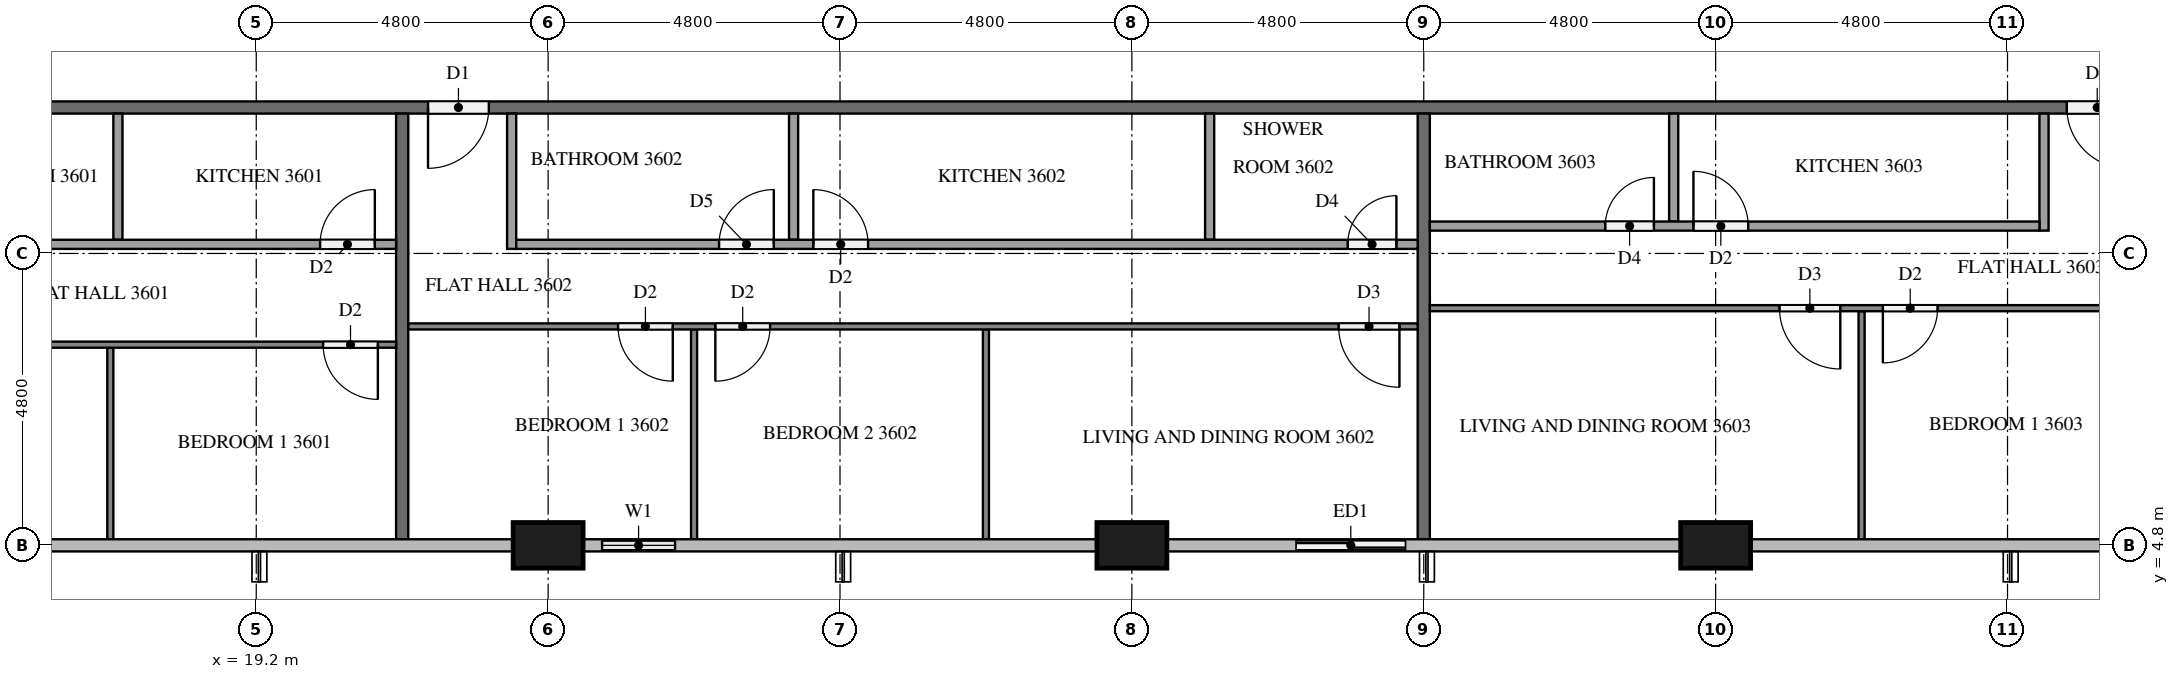
"""IFC4 building model, lengths in metres.
Left out: names, types, materials, properties, quantities, classifications, styles, units other than length and angle.
Written with IfcOpenShell. Run it as: python <this file> out.ifc"""

import sys

from ifc_helpers import new_model, si_unit, direction, frame, frame_2d, origin, origin_2d, place, context, subcontext, project, spatial, rectangle, extrude, element, fill, save


model = new_model("IFC4")
c1 = context("Model", 3, precision=1e-05, world=origin(), true_north=direction((0.0, 1.0)))
c2 = subcontext(c1, "Body", "Model", "MODEL_VIEW")
j1 = project(units=[si_unit("LENGTHUNIT", "METRE"), si_unit("PLANEANGLEUNIT", "RADIAN")], contexts=[c1])
p1 = place(None, origin())
s1 = spatial("IfcSite", under=j1, at=p1, CompositionType="ELEMENT")
p2 = place(p1, origin())
s2 = spatial("IfcBuilding", under=s1, at=p2, CompositionType="ELEMENT")
p3 = place(p2, frame((0.0, 0.0, 140.1)))
s3 = spatial("IfcBuildingStorey", under=s2, at=p3, CompositionType="ELEMENT", Elevation=140.1)
for number, where, z_axis, x_axis in (
    (1, (24.0, 4.8, 0.0), (0.0, 0.0, 1.0), (1.0, 0.0, 0.0)),
    (2, (33.6, 4.8, 0.0), (0.0, 0.0, 1.0), (1.0, 0.0, 0.0)),
    (3, (43.2, 4.8, 0.0), (0.0, 0.0, 1.0), (1.0, 0.0, 0.0)),
):
    element("IfcColumn", number, at=place(p3, frame(where, z_axis=z_axis, x_axis=x_axis)), inside=s3, PredefinedType="COLUMN", context=c2, shape_type="SweptSolid", body=[
        extrude(rectangle(XDim=1.15, YDim=0.75, at=origin_2d()), origin(), (0.0, 0.0, 1.0), 3.1),
    ])
p4 = place(p3, frame((24.575, 4.8, 0.0), z_axis=(0.0, 0.0, 1.0), x_axis=(1.0, 0.0, 0.0)))
e4 = element("IfcWall", 4, at=p4, inside=s3, PredefinedType="SOLIDWALL", context=c2, shape_type="SweptSolid", body=[
    extrude(rectangle(XDim=1.825, YDim=0.15, at=frame_2d((0.913, 0.0))), origin(), (0.0, 0.0, 1.0), 3.1),
])
p5 = place(p4, frame((0.312, 0.0, 0.9)))
e5 = element("IfcOpeningElement", 5, at=p5, cuts=e4, PredefinedType="OPENING", context=c2, shape_type="SweptSolid", body=[
    extrude(rectangle(XDim=1.2, YDim=1.4, at=frame_2d((0.6, 0.7))), frame((0.0, 0.085, 0.0), z_axis=(0.0, -1.0, 0.0), x_axis=(1.0, 0.0, 0.0)), (0.0, 0.0, 1.0), 0.17),
])
p6 = place(p3, frame((36.0, 4.8, 0.0), z_axis=(0.0, 0.0, 1.0), x_axis=(1.0, 0.0, 0.0)))
e6 = element("IfcWall", 6, at=p6, inside=s3, PredefinedType="SOLIDWALL", context=c2, shape_type="SweptSolid", body=[
    extrude(rectangle(XDim=2.4, YDim=0.15, at=frame_2d((1.2, 0.0))), origin(), (0.0, 0.0, 1.0), 3.1),
])
p7 = place(p6, frame((0.3, 0.0, 0.0)))
e7 = element("IfcOpeningElement", 7, at=p7, cuts=e6, PredefinedType="OPENING", context=c2, shape_type="SweptSolid", body=[
    extrude(rectangle(XDim=1.8, YDim=2.4, at=frame_2d((0.9, 1.2))), frame((0.0, 0.085, 0.0), z_axis=(0.0, -1.0, 0.0), x_axis=(1.0, 0.0, 0.0)), (0.0, 0.0, 1.0), 0.17),
])
p8 = place(p3, frame((50.5, 12.0, 0.0), z_axis=(0.0, 0.0, 1.0), x_axis=(-1.0, 0.0, 0.0)))
e8 = element("IfcWall", 8, at=p8, inside=s3, PredefinedType="PARTITIONING", context=c2, shape_type="SweptSolid", body=[
    extrude(rectangle(XDim=38.6, YDim=0.2, at=frame_2d((19.3, 0.0))), origin(), (0.0, 0.0, 1.0), 3.1),
])
p9 = place(p8, frame((37.075, 0.0, 0.0)))
e9 = element("IfcOpeningElement", 9, at=p9, cuts=e8, PredefinedType="OPENING", context=c2, shape_type="SweptSolid", body=[
    extrude(rectangle(XDim=1.0, YDim=2.1, at=frame_2d((0.5, 1.05))), frame((0.0, 0.11, 0.0), z_axis=(0.0, -1.0, 0.0), x_axis=(1.0, 0.0, 0.0)), (0.0, 0.0, 1.0), 0.22),
])
p10 = place(p8, frame((27.475, 0.0, 0.0)))
e10 = element("IfcOpeningElement", 10, at=p10, cuts=e8, PredefinedType="OPENING", context=c2, shape_type="SweptSolid", body=[
    extrude(rectangle(XDim=1.0, YDim=2.1, at=frame_2d((0.5, 1.05))), frame((0.0, 0.11, 0.0), z_axis=(0.0, -1.0, 0.0), x_axis=(1.0, 0.0, 0.0)), (0.0, 0.0, 1.0), 0.22),
])
p11 = place(p8, frame((0.525, 0.0, 0.0)))
e11 = element("IfcOpeningElement", 11, at=p11, cuts=e8, PredefinedType="OPENING", context=c2, shape_type="SweptSolid", body=[
    extrude(rectangle(XDim=1.0, YDim=2.1, at=frame_2d((0.5, 1.05))), frame((0.0, 0.11, 0.0), z_axis=(0.0, -1.0, 0.0), x_axis=(1.0, 0.0, 0.0)), (0.0, 0.0, 1.0), 0.22),
])
for number, where, z_axis, x_axis in (
    (12, (21.6, 11.9, 0.0), (0.0, 0.0, 1.0), (0.0, -1.0, 0.0)),
    (13, (38.4, 11.9, 0.0), (0.0, 0.0, 1.0), (0.0, -1.0, 0.0)),
):
    element("IfcWall", number, at=place(p3, frame(where, z_axis=z_axis, x_axis=x_axis)), inside=s3, PredefinedType="PARTITIONING", context=c2, shape_type="SweptSolid", body=[
        extrude(rectangle(XDim=7.0, YDim=0.2, at=frame_2d((3.5, 0.0))), origin(), (0.0, 0.0, 1.0), 3.1),
    ])
p12 = place(p3, frame((16.8, 8.05, 0.0), z_axis=(0.0, 0.0, 1.0), x_axis=(0.0, -1.0, 0.0)))
e14 = element("IfcWall", 14, at=p12, inside=s3, PredefinedType="PARTITIONING", context=c2, shape_type="SweptSolid", body=[
    extrude(rectangle(XDim=3.15, YDim=0.1, at=frame_2d((1.575, 0.0))), origin(), (0.0, 0.0, 1.0), 3.1),
])
p13 = place(p3, frame((21.5, 8.1, 0.0), z_axis=(0.0, 0.0, 1.0), x_axis=(-1.0, 0.0, 0.0)))
e15 = element("IfcWall", 15, at=p13, inside=s3, PredefinedType="PARTITIONING", context=c2, shape_type="SweptSolid", body=[
    extrude(rectangle(XDim=9.4, YDim=0.1, at=frame_2d((4.7, 0.0))), origin(), (0.0, 0.0, 1.0), 3.1),
])
p14 = place(p13, frame((8.1, 0.0, 0.0)))
e16 = element("IfcOpeningElement", 16, at=p14, cuts=e15, PredefinedType="OPENING", context=c2, shape_type="SweptSolid", body=[
    extrude(rectangle(XDim=1.0, YDim=2.1, at=frame_2d((0.5, 1.05))), frame((0.0, 0.06, 0.0), z_axis=(0.0, -1.0, 0.0), x_axis=(1.0, 0.0, 0.0)), (0.0, 0.0, 1.0), 0.12),
])
p15 = place(p13, frame((0.3, 0.0, 0.0)))
e17 = element("IfcOpeningElement", 17, at=p15, cuts=e15, PredefinedType="OPENING", context=c2, shape_type="SweptSolid", body=[
    extrude(rectangle(XDim=0.9, YDim=2.1, at=frame_2d((0.45, 1.05))), frame((0.0, 0.06, 0.0), z_axis=(0.0, -1.0, 0.0), x_axis=(1.0, 0.0, 0.0)), (0.0, 0.0, 1.0), 0.12),
])
p16 = place(p3, frame((16.925, 11.9, 0.0), z_axis=(0.0, 0.0, 1.0), x_axis=(0.0, -1.0, 0.0)))
e18 = element("IfcWall", 18, at=p16, inside=s3, PredefinedType="PARTITIONING", context=c2, shape_type="SweptSolid", body=[
    extrude(rectangle(XDim=2.075, YDim=0.15, at=frame_2d((1.038, 0.0))), origin(), (0.0, 0.0, 1.0), 3.1),
])
p17 = place(p3, frame((13.875, 9.75, 0.0), z_axis=(0.0, 0.0, 1.0), x_axis=(1.0, 0.0, 0.0)))
e19 = element("IfcWall", 19, at=p17, inside=s3, PredefinedType="PARTITIONING", context=c2, shape_type="SweptSolid", body=[
    extrude(rectangle(XDim=7.625, YDim=0.15, at=frame_2d((3.812, 0.0))), origin(), (0.0, 0.0, 1.0), 3.1),
])
p18 = place(p17, frame((0.3, 0.0, 0.0)))
e20 = element("IfcOpeningElement", 20, at=p18, cuts=e19, PredefinedType="OPENING", context=c2, shape_type="SweptSolid", body=[
    extrude(rectangle(XDim=0.8, YDim=2.1, at=frame_2d((0.4, 1.05))), frame((0.0, 0.085, 0.0), z_axis=(0.0, -1.0, 0.0), x_axis=(1.0, 0.0, 0.0)), (0.0, 0.0, 1.0), 0.17),
])
p19 = place(p17, frame((6.375, 0.0, 0.0)))
e21 = element("IfcOpeningElement", 21, at=p19, cuts=e19, PredefinedType="OPENING", context=c2, shape_type="SweptSolid", body=[
    extrude(rectangle(XDim=0.9, YDim=2.1, at=frame_2d((0.45, 1.05))), frame((0.0, 0.085, 0.0), z_axis=(0.0, -1.0, 0.0), x_axis=(1.0, 0.0, 0.0)), (0.0, 0.0, 1.0), 0.17),
])
for number, where, z_axis, x_axis in (
    (22, (26.4, 8.35, 0.0), (0.0, 0.0, 1.0), (0.0, -1.0, 0.0)),
    (23, (31.2, 8.35, 0.0), (0.0, 0.0, 1.0), (0.0, -1.0, 0.0)),
):
    element("IfcWall", number, at=place(p3, frame(where, z_axis=z_axis, x_axis=x_axis)), inside=s3, PredefinedType="PARTITIONING", context=c2, shape_type="SweptSolid", body=[
        extrude(rectangle(XDim=3.45, YDim=0.1, at=frame_2d((1.725, 0.0))), origin(), (0.0, 0.0, 1.0), 3.1),
    ])
p20 = place(p3, frame((38.3, 8.4, 0.0), z_axis=(0.0, 0.0, 1.0), x_axis=(-1.0, 0.0, 0.0)))
e24 = element("IfcWall", 24, at=p20, inside=s3, PredefinedType="PARTITIONING", context=c2, shape_type="SweptSolid", body=[
    extrude(rectangle(XDim=16.6, YDim=0.1, at=frame_2d((8.3, 0.0))), origin(), (0.0, 0.0, 1.0), 3.1),
])
p21 = place(p20, frame((12.25, 0.0, 0.0)))
e25 = element("IfcOpeningElement", 25, at=p21, cuts=e24, PredefinedType="OPENING", context=c2, shape_type="SweptSolid", body=[
    extrude(rectangle(XDim=0.9, YDim=2.1, at=frame_2d((0.45, 1.05))), frame((0.0, 0.06, 0.0), z_axis=(0.0, -1.0, 0.0), x_axis=(1.0, 0.0, 0.0)), (0.0, 0.0, 1.0), 0.12),
])
p22 = place(p20, frame((10.65, 0.0, 0.0)))
e26 = element("IfcOpeningElement", 26, at=p22, cuts=e24, PredefinedType="OPENING", context=c2, shape_type="SweptSolid", body=[
    extrude(rectangle(XDim=0.9, YDim=2.1, at=frame_2d((0.45, 1.05))), frame((0.0, 0.06, 0.0), z_axis=(0.0, -1.0, 0.0), x_axis=(1.0, 0.0, 0.0)), (0.0, 0.0, 1.0), 0.12),
])
p23 = place(p20, frame((0.3, 0.0, 0.0)))
e27 = element("IfcOpeningElement", 27, at=p23, cuts=e24, PredefinedType="OPENING", context=c2, shape_type="SweptSolid", body=[
    extrude(rectangle(XDim=1.0, YDim=2.1, at=frame_2d((0.5, 1.05))), frame((0.0, 0.06, 0.0), z_axis=(0.0, -1.0, 0.0), x_axis=(1.0, 0.0, 0.0)), (0.0, 0.0, 1.0), 0.12),
])
for number, where, z_axis, x_axis in (
    (28, (28.037, 11.9, 0.0), (0.0, 0.0, 1.0), (0.0, -1.0, 0.0)),
    (29, (34.879, 11.9, 0.0), (0.0, 0.0, 1.0), (0.0, -1.0, 0.0)),
):
    element("IfcWall", number, at=place(p3, frame(where, z_axis=z_axis, x_axis=x_axis)), inside=s3, PredefinedType="PARTITIONING", context=c2, shape_type="SweptSolid", body=[
        extrude(rectangle(XDim=2.075, YDim=0.15, at=frame_2d((1.038, 0.0))), origin(), (0.0, 0.0, 1.0), 3.1),
    ])
p24 = place(p3, frame((23.4, 11.9, 0.0), z_axis=(0.0, 0.0, 1.0), x_axis=(0.0, -1.0, 0.0)))
e30 = element("IfcWall", 30, at=p24, inside=s3, PredefinedType="PARTITIONING", context=c2, shape_type="SweptSolid", body=[
    extrude(rectangle(XDim=2.225, YDim=0.15, at=frame_2d((1.112, 0.0))), origin(), (0.0, 0.0, 1.0), 3.1),
])
p25 = place(p3, frame((23.475, 9.75, 0.0), z_axis=(0.0, 0.0, 1.0), x_axis=(1.0, 0.0, 0.0)))
e31 = element("IfcWall", 31, at=p25, inside=s3, PredefinedType="PARTITIONING", context=c2, shape_type="SweptSolid", body=[
    extrude(rectangle(XDim=14.825, YDim=0.15, at=frame_2d((7.413, 0.0))), origin(), (0.0, 0.0, 1.0), 3.1),
])
p26 = place(p25, frame((3.336, 0.0, 0.0)))
e32 = element("IfcOpeningElement", 32, at=p26, cuts=e31, PredefinedType="OPENING", context=c2, shape_type="SweptSolid", body=[
    extrude(rectangle(XDim=0.9, YDim=2.1, at=frame_2d((0.45, 1.05))), frame((0.0, 0.085, 0.0), z_axis=(0.0, -1.0, 0.0), x_axis=(1.0, 0.0, 0.0)), (0.0, 0.0, 1.0), 0.17),
])
p27 = place(p25, frame((4.886, 0.0, 0.0)))
e33 = element("IfcOpeningElement", 33, at=p27, cuts=e31, PredefinedType="OPENING", context=c2, shape_type="SweptSolid", body=[
    extrude(rectangle(XDim=0.9, YDim=2.1, at=frame_2d((0.45, 1.05))), frame((0.0, 0.085, 0.0), z_axis=(0.0, -1.0, 0.0), x_axis=(1.0, 0.0, 0.0)), (0.0, 0.0, 1.0), 0.17),
])
p28 = place(p25, frame((13.675, 0.0, 0.0)))
e34 = element("IfcOpeningElement", 34, at=p28, cuts=e31, PredefinedType="OPENING", context=c2, shape_type="SweptSolid", body=[
    extrude(rectangle(XDim=0.8, YDim=2.1, at=frame_2d((0.4, 1.05))), frame((0.0, 0.085, 0.0), z_axis=(0.0, -1.0, 0.0), x_axis=(1.0, 0.0, 0.0)), (0.0, 0.0, 1.0), 0.17),
])
p29 = place(p3, frame((45.6, 8.65, 0.0), z_axis=(0.0, 0.0, 1.0), x_axis=(0.0, -1.0, 0.0)))
e35 = element("IfcWall", 35, at=p29, inside=s3, PredefinedType="PARTITIONING", context=c2, shape_type="SweptSolid", body=[
    extrude(rectangle(XDim=3.75, YDim=0.1, at=frame_2d((1.875, 0.0))), origin(), (0.0, 0.0, 1.0), 3.1),
])
p30 = place(p3, frame((50.3, 8.7, 0.0), z_axis=(0.0, 0.0, 1.0), x_axis=(-1.0, 0.0, 0.0)))
e36 = element("IfcWall", 36, at=p30, inside=s3, PredefinedType="PARTITIONING", context=c2, shape_type="SweptSolid", body=[
    extrude(rectangle(XDim=11.8, YDim=0.1, at=frame_2d((5.9, 0.0))), origin(), (0.0, 0.0, 1.0), 3.1),
])
p31 = place(p30, frame((3.45, 0.0, 0.0)))
e37 = element("IfcOpeningElement", 37, at=p31, cuts=e36, PredefinedType="OPENING", context=c2, shape_type="SweptSolid", body=[
    extrude(rectangle(XDim=0.9, YDim=2.1, at=frame_2d((0.45, 1.05))), frame((0.0, 0.06, 0.0), z_axis=(0.0, -1.0, 0.0), x_axis=(1.0, 0.0, 0.0)), (0.0, 0.0, 1.0), 0.12),
])
p32 = place(p30, frame((5.05, 0.0, 0.0)))
e38 = element("IfcOpeningElement", 38, at=p32, cuts=e36, PredefinedType="OPENING", context=c2, shape_type="SweptSolid", body=[
    extrude(rectangle(XDim=1.0, YDim=2.1, at=frame_2d((0.5, 1.05))), frame((0.0, 0.06, 0.0), z_axis=(0.0, -1.0, 0.0), x_axis=(1.0, 0.0, 0.0)), (0.0, 0.0, 1.0), 0.12),
])
p33 = place(p3, frame((42.51, 11.9, 0.0), z_axis=(0.0, 0.0, 1.0), x_axis=(0.0, -1.0, 0.0)))
e39 = element("IfcWall", 39, at=p33, inside=s3, PredefinedType="PARTITIONING", context=c2, shape_type="SweptSolid", body=[
    extrude(rectangle(XDim=1.775, YDim=0.15, at=frame_2d((0.887, 0.0))), origin(), (0.0, 0.0, 1.0), 3.1),
])
p34 = place(p3, frame((48.6, 11.9, 0.0), z_axis=(0.0, 0.0, 1.0), x_axis=(0.0, -1.0, 0.0)))
e40 = element("IfcWall", 40, at=p34, inside=s3, PredefinedType="PARTITIONING", context=c2, shape_type="SweptSolid", body=[
    extrude(rectangle(XDim=1.925, YDim=0.15, at=frame_2d((0.962, 0.0))), origin(), (0.0, 0.0, 1.0), 3.1),
])
p35 = place(p3, frame((38.5, 10.05, 0.0), z_axis=(0.0, 0.0, 1.0), x_axis=(1.0, 0.0, 0.0)))
e41 = element("IfcWall", 41, at=p35, inside=s3, PredefinedType="PARTITIONING", context=c2, shape_type="SweptSolid", body=[
    extrude(rectangle(XDim=10.025, YDim=0.15, at=frame_2d((5.012, 0.0))), origin(), (0.0, 0.0, 1.0), 3.1),
])
p36 = place(p35, frame((4.335, 0.0, 0.0)))
e42 = element("IfcOpeningElement", 42, at=p36, cuts=e41, PredefinedType="OPENING", context=c2, shape_type="SweptSolid", body=[
    extrude(rectangle(XDim=0.9, YDim=2.1, at=frame_2d((0.45, 1.05))), frame((0.0, 0.085, 0.0), z_axis=(0.0, -1.0, 0.0), x_axis=(1.0, 0.0, 0.0)), (0.0, 0.0, 1.0), 0.17),
])
p37 = place(p35, frame((2.885, 0.0, 0.0)))
e43 = element("IfcOpeningElement", 43, at=p37, cuts=e41, PredefinedType="OPENING", context=c2, shape_type="SweptSolid", body=[
    extrude(rectangle(XDim=0.8, YDim=2.1, at=frame_2d((0.4, 1.05))), frame((0.0, 0.085, 0.0), z_axis=(0.0, -1.0, 0.0), x_axis=(1.0, 0.0, 0.0)), (0.0, 0.0, 1.0), 0.17),
])
p38 = place(p5, origin())
e44 = element("IfcWindow", 44, at=p38, inside=s3, PartitioningType="SINGLE_PANEL", PredefinedType="WINDOW", context=c2, shape_type="SweptSolid", body=[
    extrude(rectangle(XDim=1.2, YDim=1.4, at=frame_2d((0.6, 0.7))), frame((0.0, 0.03, 0.0), z_axis=(0.0, -1.0, 0.0), x_axis=(1.0, 0.0, 0.0)), (0.0, 0.0, 1.0), 0.06),
])
fill(e5, e44)
p39 = place(p7, origin())
e45 = element("IfcDoor", 45, at=p39, inside=s3, OperationType="SLIDING_TO_LEFT", PredefinedType="DOOR", context=c2, shape_type="SweptSolid", body=[
    extrude(rectangle(XDim=1.8, YDim=2.4, at=frame_2d((0.9, 1.2))), frame((0.0, 0.025, 0.0), z_axis=(0.0, -1.0, 0.0), x_axis=(1.0, 0.0, 0.0)), (0.0, 0.0, 1.0), 0.05),
])
fill(e7, e45)
p40 = place(p10, origin())
e46 = element("IfcDoor", 46, at=p40, inside=s3, OperationType="SINGLE_SWING_RIGHT", PredefinedType="DOOR", context=c2, shape_type="SweptSolid", body=[
    extrude(rectangle(XDim=1.0, YDim=2.1, at=frame_2d((0.5, 1.05))), frame((0.0, 0.025, 0.0), z_axis=(0.0, -1.0, 0.0), x_axis=(1.0, 0.0, 0.0)), (0.0, 0.0, 1.0), 0.05),
])
fill(e10, e46)
p41 = place(p11, origin())
e47 = element("IfcDoor", 47, at=p41, inside=s3, OperationType="SINGLE_SWING_LEFT", PredefinedType="DOOR", context=c2, shape_type="SweptSolid", body=[
    extrude(rectangle(XDim=1.0, YDim=2.1, at=frame_2d((0.5, 1.05))), frame((0.0, 0.025, 0.0), z_axis=(0.0, -1.0, 0.0), x_axis=(1.0, 0.0, 0.0)), (0.0, 0.0, 1.0), 0.05),
])
fill(e11, e47)
p42 = place(p15, origin())
e48 = element("IfcDoor", 48, at=p42, inside=s3, OperationType="SINGLE_SWING_LEFT", PredefinedType="DOOR", context=c2, shape_type="SweptSolid", body=[
    extrude(rectangle(XDim=0.9, YDim=2.1, at=frame_2d((0.45, 1.05))), frame((0.0, 0.025, 0.0), z_axis=(0.0, -1.0, 0.0), x_axis=(1.0, 0.0, 0.0)), (0.0, 0.0, 1.0), 0.05),
])
fill(e17, e48)
p43 = place(p19, origin())
e49 = element("IfcDoor", 49, at=p43, inside=s3, OperationType="SINGLE_SWING_RIGHT", PredefinedType="DOOR", context=c2, shape_type="SweptSolid", body=[
    extrude(rectangle(XDim=0.9, YDim=2.1, at=frame_2d((0.45, 1.05))), frame((0.0, 0.025, 0.0), z_axis=(0.0, -1.0, 0.0), x_axis=(1.0, 0.0, 0.0)), (0.0, 0.0, 1.0), 0.05),
])
fill(e21, e49)
p44 = place(p21, origin())
e50 = element("IfcDoor", 50, at=p44, inside=s3, OperationType="SINGLE_SWING_LEFT", PredefinedType="DOOR", context=c2, shape_type="SweptSolid", body=[
    extrude(rectangle(XDim=0.9, YDim=2.1, at=frame_2d((0.45, 1.05))), frame((0.0, 0.025, 0.0), z_axis=(0.0, -1.0, 0.0), x_axis=(1.0, 0.0, 0.0)), (0.0, 0.0, 1.0), 0.05),
])
fill(e25, e50)
p45 = place(p22, origin())
e51 = element("IfcDoor", 51, at=p45, inside=s3, OperationType="SINGLE_SWING_RIGHT", PredefinedType="DOOR", context=c2, shape_type="SweptSolid", body=[
    extrude(rectangle(XDim=0.9, YDim=2.1, at=frame_2d((0.45, 1.05))), frame((0.0, 0.025, 0.0), z_axis=(0.0, -1.0, 0.0), x_axis=(1.0, 0.0, 0.0)), (0.0, 0.0, 1.0), 0.05),
])
fill(e26, e51)
p46 = place(p23, origin())
e52 = element("IfcDoor", 52, at=p46, inside=s3, OperationType="SINGLE_SWING_LEFT", PredefinedType="DOOR", context=c2, shape_type="SweptSolid", body=[
    extrude(rectangle(XDim=1.0, YDim=2.1, at=frame_2d((0.5, 1.05))), frame((0.0, 0.025, 0.0), z_axis=(0.0, -1.0, 0.0), x_axis=(1.0, 0.0, 0.0)), (0.0, 0.0, 1.0), 0.05),
])
fill(e27, e52)
p47 = place(p26, origin())
e53 = element("IfcDoor", 53, at=p47, inside=s3, OperationType="SINGLE_SWING_RIGHT", PredefinedType="DOOR", context=c2, shape_type="SweptSolid", body=[
    extrude(rectangle(XDim=0.9, YDim=2.1, at=frame_2d((0.45, 1.05))), frame((0.0, 0.025, 0.0), z_axis=(0.0, -1.0, 0.0), x_axis=(1.0, 0.0, 0.0)), (0.0, 0.0, 1.0), 0.05),
])
fill(e32, e53)
p48 = place(p27, origin())
e54 = element("IfcDoor", 54, at=p48, inside=s3, OperationType="SINGLE_SWING_LEFT", PredefinedType="DOOR", context=c2, shape_type="SweptSolid", body=[
    extrude(rectangle(XDim=0.9, YDim=2.1, at=frame_2d((0.45, 1.05))), frame((0.0, 0.025, 0.0), z_axis=(0.0, -1.0, 0.0), x_axis=(1.0, 0.0, 0.0)), (0.0, 0.0, 1.0), 0.05),
])
fill(e33, e54)
p49 = place(p28, origin())
e55 = element("IfcDoor", 55, at=p49, inside=s3, OperationType="SINGLE_SWING_RIGHT", PredefinedType="DOOR", context=c2, shape_type="SweptSolid", body=[
    extrude(rectangle(XDim=0.8, YDim=2.1, at=frame_2d((0.4, 1.05))), frame((0.0, 0.025, 0.0), z_axis=(0.0, -1.0, 0.0), x_axis=(1.0, 0.0, 0.0)), (0.0, 0.0, 1.0), 0.05),
])
fill(e34, e55)
p50 = place(p31, origin())
e56 = element("IfcDoor", 56, at=p50, inside=s3, OperationType="SINGLE_SWING_RIGHT", PredefinedType="DOOR", context=c2, shape_type="SweptSolid", body=[
    extrude(rectangle(XDim=0.9, YDim=2.1, at=frame_2d((0.45, 1.05))), frame((0.0, 0.025, 0.0), z_axis=(0.0, -1.0, 0.0), x_axis=(1.0, 0.0, 0.0)), (0.0, 0.0, 1.0), 0.05),
])
fill(e37, e56)
p51 = place(p32, origin())
e57 = element("IfcDoor", 57, at=p51, inside=s3, OperationType="SINGLE_SWING_LEFT", PredefinedType="DOOR", context=c2, shape_type="SweptSolid", body=[
    extrude(rectangle(XDim=1.0, YDim=2.1, at=frame_2d((0.5, 1.05))), frame((0.0, 0.025, 0.0), z_axis=(0.0, -1.0, 0.0), x_axis=(1.0, 0.0, 0.0)), (0.0, 0.0, 1.0), 0.05),
])
fill(e38, e57)
p52 = place(p36, origin())
e58 = element("IfcDoor", 58, at=p52, inside=s3, OperationType="SINGLE_SWING_LEFT", PredefinedType="DOOR", context=c2, shape_type="SweptSolid", body=[
    extrude(rectangle(XDim=0.9, YDim=2.1, at=frame_2d((0.45, 1.05))), frame((0.0, 0.025, 0.0), z_axis=(0.0, -1.0, 0.0), x_axis=(1.0, 0.0, 0.0)), (0.0, 0.0, 1.0), 0.05),
])
fill(e42, e58)
p53 = place(p37, origin())
e59 = element("IfcDoor", 59, at=p53, inside=s3, OperationType="SINGLE_SWING_RIGHT", PredefinedType="DOOR", context=c2, shape_type="SweptSolid", body=[
    extrude(rectangle(XDim=0.8, YDim=2.1, at=frame_2d((0.4, 1.05))), frame((0.0, 0.025, 0.0), z_axis=(0.0, -1.0, 0.0), x_axis=(1.0, 0.0, 0.0)), (0.0, 0.0, 1.0), 0.05),
])
fill(e43, e59)
save(model, sys.argv[1])
